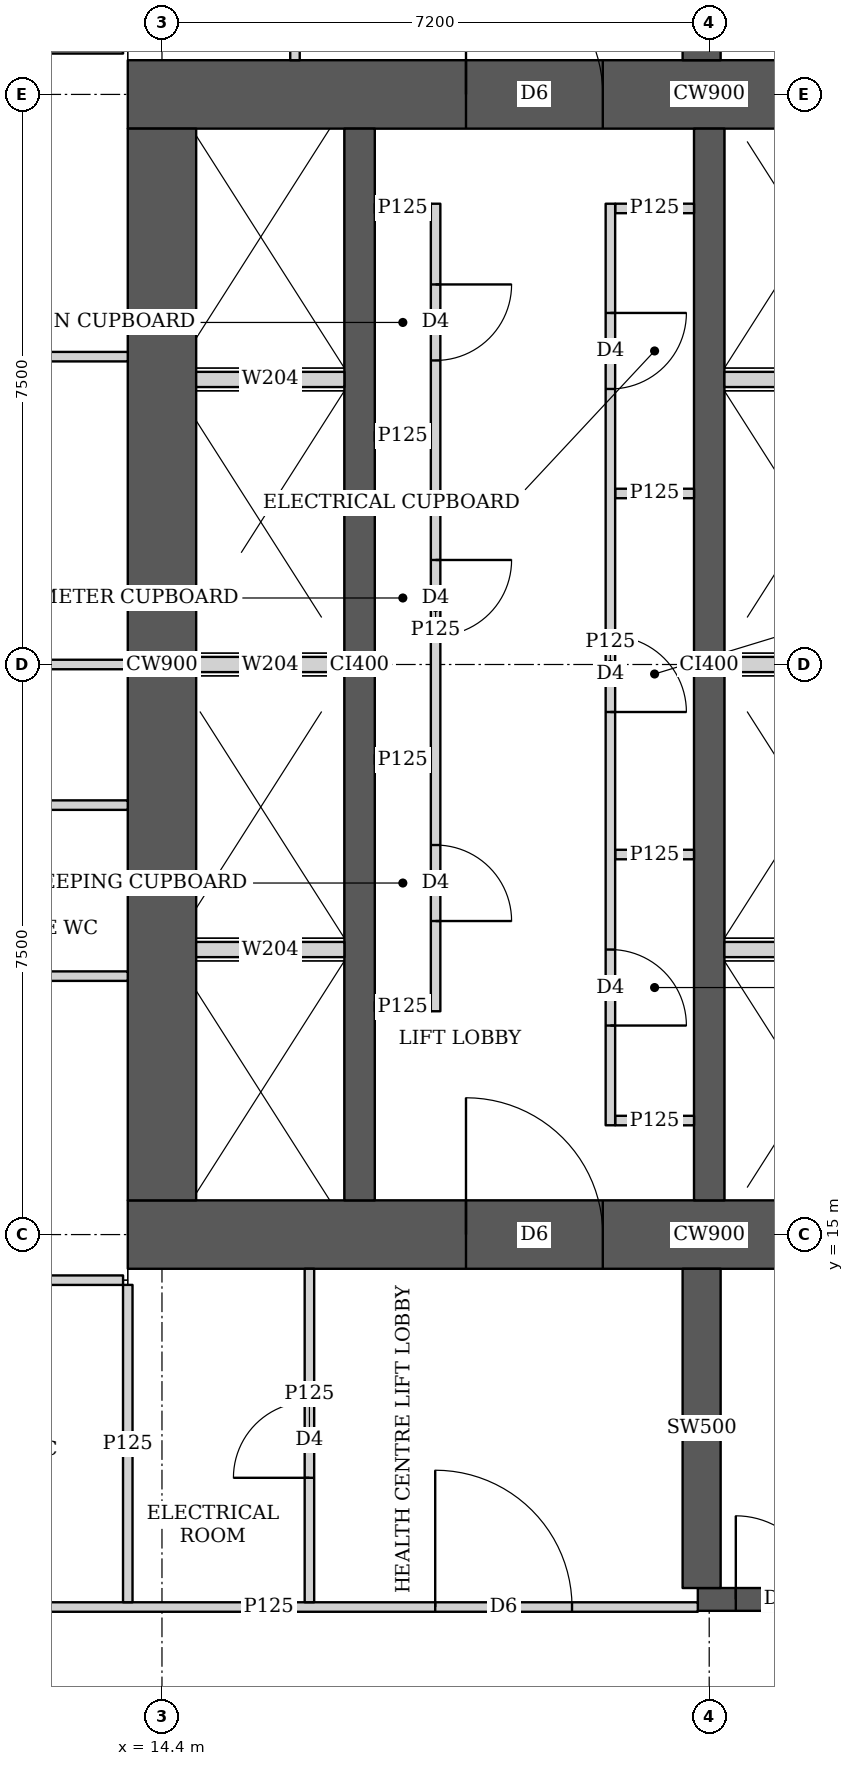
"""IFC4 building model, lengths in metres.
Left out: names, types, materials, properties, quantities, classifications, styles, units other than length and angle.
Written with IfcOpenShell. Run it as: python <this file> out.ifc"""

import sys

from ifc_helpers import new_model, si_unit, direction, frame, frame_2d, origin, place, context, subcontext, project, spatial, rectangle, extrude, element, fill, save


model = new_model("IFC4")
c1 = context("Model", 3, precision=1e-05, world=origin(), true_north=direction((0.0, 1.0)))
c2 = subcontext(c1, "Body", "Model", "MODEL_VIEW")
j1 = project(units=[si_unit("LENGTHUNIT", "METRE"), si_unit("PLANEANGLEUNIT", "RADIAN")], contexts=[c1])
p1 = place(None, origin())
s1 = spatial("IfcSite", under=j1, at=p1, CompositionType="ELEMENT")
p2 = place(p1, origin())
s2 = spatial("IfcBuilding", under=s1, at=p2, CompositionType="ELEMENT")
p3 = place(p2, frame((0.0, 0.0, 5.6)))
s3 = spatial("IfcBuildingStorey", under=s2, at=p3, CompositionType="ELEMENT", Elevation=5.6)
p4 = place(p3, frame((13.95, 15.0, 0.0), z_axis=(0.0, 0.0, 1.0), x_axis=(1.0, 0.0, 0.0)))
e1 = element("IfcWall", 1, at=p4, inside=s3, PredefinedType="SHEAR", context=c2, shape_type="SweptSolid", body=[
    extrude(rectangle(XDim=15.3, YDim=0.9, at=frame_2d((7.65, 0.0))), origin(), (0.0, 0.0, 1.0), 4.5),
])
p5 = place(p4, frame((4.45, 0.0, 0.0)))
e2 = element("IfcOpeningElement", 2, at=p5, cuts=e1, PredefinedType="OPENING", context=c2, shape_type="SweptSolid", body=[
    extrude(rectangle(XDim=1.8, YDim=2.1, at=frame_2d((0.9, 1.05))), frame((0.0, 0.46, 0.0), z_axis=(0.0, -1.0, 0.0), x_axis=(1.0, 0.0, 0.0)), (0.0, 0.0, 1.0), 0.92),
])
p6 = place(p4, frame((10.7, 0.0, 0.0)))
e3 = element("IfcOpeningElement", 3, at=p6, cuts=e1, PredefinedType="OPENING", context=c2, shape_type="SweptSolid", body=[
    extrude(rectangle(XDim=1.1, YDim=2.1, at=frame_2d((0.55, 1.05))), frame((0.0, 0.46, 0.0), z_axis=(0.0, -1.0, 0.0), x_axis=(1.0, 0.0, 0.0)), (0.0, 0.0, 1.0), 0.92),
])
p7 = place(p3, frame((13.95, 30.0, 0.0), z_axis=(0.0, 0.0, 1.0), x_axis=(1.0, 0.0, 0.0)))
e4 = element("IfcWall", 4, at=p7, inside=s3, PredefinedType="SHEAR", context=c2, shape_type="SweptSolid", body=[
    extrude(rectangle(XDim=15.3, YDim=0.9, at=frame_2d((7.65, 0.0))), origin(), (0.0, 0.0, 1.0), 4.5),
])
p8 = place(p7, frame((4.45, 0.0, 0.0)))
e5 = element("IfcOpeningElement", 5, at=p8, cuts=e4, PredefinedType="OPENING", context=c2, shape_type="SweptSolid", body=[
    extrude(rectangle(XDim=1.8, YDim=2.1, at=frame_2d((0.9, 1.05))), frame((0.0, 0.46, 0.0), z_axis=(0.0, -1.0, 0.0), x_axis=(1.0, 0.0, 0.0)), (0.0, 0.0, 1.0), 0.92),
])
p9 = place(p7, frame((10.7, 0.0, 0.0)))
e6 = element("IfcOpeningElement", 6, at=p9, cuts=e4, PredefinedType="OPENING", context=c2, shape_type="SweptSolid", body=[
    extrude(rectangle(XDim=1.1, YDim=2.1, at=frame_2d((0.55, 1.05))), frame((0.0, 0.46, 0.0), z_axis=(0.0, -1.0, 0.0), x_axis=(1.0, 0.0, 0.0)), (0.0, 0.0, 1.0), 0.92),
])
p10 = place(p3, frame((14.4, 15.45, 0.0), z_axis=(0.0, 0.0, 1.0), x_axis=(0.0, 1.0, 0.0)))
e7 = element("IfcWall", 7, at=p10, inside=s3, PredefinedType="SHEAR", context=c2, shape_type="SweptSolid", body=[
    extrude(rectangle(XDim=14.1, YDim=0.9, at=frame_2d((7.05, 0.0))), origin(), (0.0, 0.0, 1.0), 4.5),
])
for number, where, z_axis, x_axis in (
    (8, (17.0, 15.45, 0.0), (0.0, 0.0, 1.0), (0.0, 1.0, 0.0)),
    (9, (21.6, 15.45, 0.0), (0.0, 0.0, 1.0), (0.0, 1.0, 0.0)),
):
    element("IfcWall", number, at=place(p3, frame(where, z_axis=z_axis, x_axis=x_axis)), inside=s3, PredefinedType="SHEAR", context=c2, shape_type="SweptSolid", body=[
        extrude(rectangle(XDim=14.1, YDim=0.4, at=frame_2d((7.05, 0.0))), origin(), (0.0, 0.0, 1.0), 4.5),
    ])
p11 = place(p3, frame((21.45, 10.2, 0.0), z_axis=(0.0, 0.0, 1.0), x_axis=(1.0, 0.0, 0.0)))
e10 = element("IfcWall", 10, at=p11, inside=s3, PredefinedType="SHEAR", context=c2, shape_type="SweptSolid", body=[
    extrude(rectangle(XDim=7.5, YDim=0.3, at=frame_2d((3.75, 0.0))), origin(), (0.0, 0.0, 1.0), 4.5),
])
p12 = place(p11, frame((0.5, 0.0, 0.0)))
e11 = element("IfcOpeningElement", 11, at=p12, cuts=e10, PredefinedType="OPENING", context=c2, shape_type="SweptSolid", body=[
    extrude(rectangle(XDim=1.1, YDim=2.1, at=frame_2d((0.55, 1.05))), frame((0.0, 0.16, 0.0), z_axis=(0.0, -1.0, 0.0), x_axis=(1.0, 0.0, 0.0)), (0.0, 0.0, 1.0), 0.32),
])
for number, where, z_axis, x_axis in (
    (12, (21.5, 10.35, 0.0), (0.0, 0.0, 1.0), (0.0, 1.0, 0.0)),
    (13, (21.5, 30.45, 0.0), (0.0, 0.0, 1.0), (0.0, 1.0, 0.0)),
):
    element("IfcWall", number, at=place(p3, frame(where, z_axis=z_axis, x_axis=x_axis)), inside=s3, PredefinedType="SHEAR", context=c2, shape_type="SweptSolid", body=[
        extrude(rectangle(XDim=4.2, YDim=0.5, at=frame_2d((2.1, 0.0))), origin(), (0.0, 0.0, 1.0), 4.5),
    ])
p13 = place(p3, frame((10.163, 14.4, 0.0), z_axis=(0.0, 0.0, 1.0), x_axis=(1.0, 0.0, 0.0)))
e14 = element("IfcWall", 14, at=p13, inside=s3, PredefinedType="PARTITIONING", context=c2, shape_type="SweptSolid", body=[
    extrude(rectangle(XDim=3.725, YDim=0.125, at=frame_2d((1.862, 0.0))), origin(), (0.0, 0.0, 1.0), 2.6),
])
p14 = place(p3, frame((10.163, 22.5, 0.0), z_axis=(0.0, 0.0, 1.0), x_axis=(1.0, 0.0, 0.0)))
e15 = element("IfcWall", 15, at=p14, inside=s3, PredefinedType="PARTITIONING", context=c2, shape_type="SweptSolid", body=[
    extrude(rectangle(XDim=3.787, YDim=0.125, at=frame_2d((1.894, 0.0))), origin(), (0.0, 0.0, 1.0), 2.6),
])
p15 = place(p3, frame((10.163, 30.6, 0.0), z_axis=(0.0, 0.0, 1.0), x_axis=(1.0, 0.0, 0.0)))
e16 = element("IfcWall", 16, at=p15, inside=s3, PredefinedType="PARTITIONING", context=c2, shape_type="SweptSolid", body=[
    extrude(rectangle(XDim=3.725, YDim=0.125, at=frame_2d((1.862, 0.0))), origin(), (0.0, 0.0, 1.0), 2.6),
])
p16 = place(p3, frame((13.95, 10.163, 0.0), z_axis=(0.0, 0.0, 1.0), x_axis=(0.0, 1.0, 0.0)))
e17 = element("IfcWall", 17, at=p16, inside=s3, PredefinedType="PARTITIONING", context=c2, shape_type="SweptSolid", body=[
    extrude(rectangle(XDim=4.175, YDim=0.125, at=frame_2d((2.087, 0.0))), origin(), (0.0, 0.0, 1.0), 2.6),
])
p17 = place(p3, frame((10.163, 10.1, 0.0), z_axis=(0.0, 0.0, 1.0), x_axis=(1.0, 0.0, 0.0)))
e18 = element("IfcWall", 18, at=p17, inside=s3, PredefinedType="PARTITIONING", context=c2, shape_type="SweptSolid", body=[
    extrude(rectangle(XDim=11.287, YDim=0.125, at=frame_2d((5.644, 0.0))), origin(), (0.0, 0.0, 1.0), 2.2),
])
p18 = place(p17, frame((7.832, 0.0, 0.0)))
e19 = element("IfcOpeningElement", 19, at=p18, cuts=e18, PredefinedType="OPENING", context=c2, shape_type="SweptSolid", body=[
    extrude(rectangle(XDim=1.8, YDim=2.1, at=frame_2d((0.9, 1.05))), frame((0.0, 0.073, 0.0), z_axis=(0.0, -1.0, 0.0), x_axis=(1.0, 0.0, 0.0)), (0.0, 0.0, 1.0), 0.145),
])
p19 = place(p3, frame((16.34, 10.163, 0.0), z_axis=(0.0, 0.0, 1.0), x_axis=(0.0, 1.0, 0.0)))
e20 = element("IfcWall", 20, at=p19, inside=s3, PredefinedType="PARTITIONING", context=c2, shape_type="SweptSolid", body=[
    extrude(rectangle(XDim=4.387, YDim=0.125, at=frame_2d((2.193, 0.0))), origin(), (0.0, 0.0, 1.0), 4.2),
])
p20 = place(p19, frame((1.637, 0.0, 0.0)))
e21 = element("IfcOpeningElement", 21, at=p20, cuts=e20, PredefinedType="OPENING", context=c2, shape_type="SweptSolid", body=[
    extrude(rectangle(XDim=1.0, YDim=2.1, at=frame_2d((0.5, 1.05))), frame((0.0, 0.073, 0.0), z_axis=(0.0, -1.0, 0.0), x_axis=(1.0, 0.0, 0.0)), (0.0, 0.0, 1.0), 0.145),
])
p21 = place(p3, frame((16.15, 30.45, 0.0), z_axis=(0.0, 0.0, 1.0), x_axis=(0.0, 1.0, 0.0)))
e22 = element("IfcWall", 22, at=p21, inside=s3, PredefinedType="PARTITIONING", context=c2, shape_type="SweptSolid", body=[
    extrude(rectangle(XDim=4.387, YDim=0.125, at=frame_2d((2.193, 0.0))), origin(), (0.0, 0.0, 1.0), 4.2),
])
p22 = place(p21, frame((1.75, 0.0, 0.0)))
e23 = element("IfcOpeningElement", 23, at=p22, cuts=e22, PredefinedType="OPENING", context=c2, shape_type="SweptSolid", body=[
    extrude(rectangle(XDim=1.0, YDim=2.1, at=frame_2d((0.5, 1.05))), frame((0.0, 0.073, 0.0), z_axis=(0.0, -1.0, 0.0), x_axis=(1.0, 0.0, 0.0)), (0.0, 0.0, 1.0), 0.145),
])
for number, where, z_axis, x_axis in (
    (24, (10.163, 18.4, 0.0), (0.0, 0.0, 1.0), (1.0, 0.0, 0.0)),
    (25, (10.163, 20.65, 0.0), (0.0, 0.0, 1.0), (1.0, 0.0, 0.0)),
    (26, (10.163, 26.55, 0.0), (0.0, 0.0, 1.0), (1.0, 0.0, 0.0)),
):
    element("IfcWall", number, at=place(p3, frame(where, z_axis=z_axis, x_axis=x_axis)), inside=s3, PredefinedType="PARTITIONING", context=c2, shape_type="SweptSolid", body=[
        extrude(rectangle(XDim=3.787, YDim=0.125, at=frame_2d((1.894, 0.0))), origin(), (0.0, 0.0, 1.0), 4.2),
    ])
p23 = place(p3, frame((20.3, 16.438, 0.0), z_axis=(0.0, 0.0, 1.0), x_axis=(0.0, 1.0, 0.0)))
e27 = element("IfcWall", 27, at=p23, inside=s3, PredefinedType="PARTITIONING", context=c2, shape_type="SweptSolid", body=[
    extrude(rectangle(XDim=12.124, YDim=0.125, at=frame_2d((6.062, 0.0))), origin(), (0.0, 0.0, 1.0), 4.2),
])
p24 = place(p23, frame((1.312, 0.0, 0.0)))
e28 = element("IfcOpeningElement", 28, at=p24, cuts=e27, PredefinedType="OPENING", context=c2, shape_type="SweptSolid", body=[
    extrude(rectangle(XDim=1.0, YDim=2.1, at=frame_2d((0.5, 1.05))), frame((0.0, 0.073, 0.0), z_axis=(0.0, -1.0, 0.0), x_axis=(1.0, 0.0, 0.0)), (0.0, 0.0, 1.0), 0.145),
])
p25 = place(p23, frame((5.437, 0.0, 0.0)))
e29 = element("IfcOpeningElement", 29, at=p25, cuts=e27, PredefinedType="OPENING", context=c2, shape_type="SweptSolid", body=[
    extrude(rectangle(XDim=1.0, YDim=2.1, at=frame_2d((0.5, 1.05))), frame((0.0, 0.073, 0.0), z_axis=(0.0, -1.0, 0.0), x_axis=(1.0, 0.0, 0.0)), (0.0, 0.0, 1.0), 0.145),
])
p26 = place(p23, frame((9.687, 0.0, 0.0)))
e30 = element("IfcOpeningElement", 30, at=p26, cuts=e27, PredefinedType="OPENING", context=c2, shape_type="SweptSolid", body=[
    extrude(rectangle(XDim=1.0, YDim=2.1, at=frame_2d((0.5, 1.05))), frame((0.0, 0.073, 0.0), z_axis=(0.0, -1.0, 0.0), x_axis=(1.0, 0.0, 0.0)), (0.0, 0.0, 1.0), 0.145),
])
for number, where, z_axis, x_axis in (
    (31, (20.363, 16.5, 0.0), (0.0, 0.0, 1.0), (1.0, 0.0, 0.0)),
    (32, (20.363, 28.5, 0.0), (0.0, 0.0, 1.0), (1.0, 0.0, 0.0)),
    (33, (20.363, 20.0, 0.0), (0.0, 0.0, 1.0), (1.0, 0.0, 0.0)),
    (34, (20.363, 24.75, 0.0), (0.0, 0.0, 1.0), (1.0, 0.0, 0.0)),
):
    element("IfcWall", number, at=place(p3, frame(where, z_axis=z_axis, x_axis=x_axis)), inside=s3, PredefinedType="PARTITIONING", context=c2, shape_type="SweptSolid", body=[
        extrude(rectangle(XDim=1.037, YDim=0.125, at=frame_2d((0.519, 0.0))), origin(), (0.0, 0.0, 1.0), 4.2),
    ])
p27 = place(p3, frame((18.0, 28.562, 0.0), z_axis=(0.0, 0.0, 1.0), x_axis=(0.0, -1.0, 0.0)))
e35 = element("IfcWall", 35, at=p27, inside=s3, PredefinedType="PARTITIONING", context=c2, shape_type="SweptSolid", body=[
    extrude(rectangle(XDim=10.624, YDim=0.125, at=frame_2d((5.312, 0.0))), origin(), (0.0, 0.0, 1.0), 4.2),
])
p28 = place(p27, frame((8.437, 0.0, 0.0)))
e36 = element("IfcOpeningElement", 36, at=p28, cuts=e35, PredefinedType="OPENING", context=c2, shape_type="SweptSolid", body=[
    extrude(rectangle(XDim=1.0, YDim=2.1, at=frame_2d((0.5, 1.05))), frame((0.0, 0.073, 0.0), z_axis=(0.0, -1.0, 0.0), x_axis=(1.0, 0.0, 0.0)), (0.0, 0.0, 1.0), 0.145),
])
p29 = place(p27, frame((4.687, 0.0, 0.0)))
e37 = element("IfcOpeningElement", 37, at=p29, cuts=e35, PredefinedType="OPENING", context=c2, shape_type="SweptSolid", body=[
    extrude(rectangle(XDim=1.0, YDim=2.1, at=frame_2d((0.5, 1.05))), frame((0.0, 0.073, 0.0), z_axis=(0.0, -1.0, 0.0), x_axis=(1.0, 0.0, 0.0)), (0.0, 0.0, 1.0), 0.145),
])
p30 = place(p27, frame((1.062, 0.0, 0.0)))
e38 = element("IfcOpeningElement", 38, at=p30, cuts=e35, PredefinedType="OPENING", context=c2, shape_type="SweptSolid", body=[
    extrude(rectangle(XDim=1.0, YDim=2.1, at=frame_2d((0.5, 1.05))), frame((0.0, 0.073, 0.0), z_axis=(0.0, -1.0, 0.0), x_axis=(1.0, 0.0, 0.0)), (0.0, 0.0, 1.0), 0.145),
])
for number, where, z_axis, x_axis in (
    (39, (17.2, 18.0, 0.0), (0.0, 0.0, 1.0), (1.0, 0.0, 0.0)),
    (40, (17.2, 28.5, 0.0), (0.0, 0.0, 1.0), (1.0, 0.0, 0.0)),
    (41, (17.2, 21.25, 0.0), (0.0, 0.0, 1.0), (1.0, 0.0, 0.0)),
    (42, (17.2, 25.5, 0.0), (0.0, 0.0, 1.0), (1.0, 0.0, 0.0)),
):
    element("IfcWall", number, at=place(p3, frame(where, z_axis=z_axis, x_axis=x_axis)), inside=s3, PredefinedType="PARTITIONING", context=c2, shape_type="SweptSolid", body=[
        extrude(rectangle(XDim=0.738, YDim=0.125, at=frame_2d((0.369, 0.0))), origin(), (0.0, 0.0, 1.0), 4.2),
    ])
p31 = place(p3, frame((14.85, 18.75, 0.0), z_axis=(0.0, 0.0, 1.0), x_axis=(1.0, 0.0, 0.0)))
e43 = element("IfcWall", 43, at=p31, inside=s3, PredefinedType="SOLIDWALL", context=c2, shape_type="SweptSolid", body=[
    extrude(rectangle(XDim=1.95, YDim=0.2, at=frame_2d((0.975, 0.0))), origin(), (0.0, 0.0, 1.0), 4.2),
])
p32 = place(p3, frame((21.8, 18.75, 0.0), z_axis=(0.0, 0.0, 1.0), x_axis=(1.0, 0.0, 0.0)))
e44 = element("IfcWall", 44, at=p32, inside=s3, PredefinedType="SOLIDWALL", context=c2, shape_type="SweptSolid", body=[
    extrude(rectangle(XDim=2.2, YDim=0.2, at=frame_2d((1.1, 0.0))), origin(), (0.0, 0.0, 1.0), 4.2),
])
p33 = place(p3, frame((14.85, 22.5, 0.0), z_axis=(0.0, 0.0, 1.0), x_axis=(1.0, 0.0, 0.0)))
e45 = element("IfcWall", 45, at=p33, inside=s3, PredefinedType="SOLIDWALL", context=c2, shape_type="SweptSolid", body=[
    extrude(rectangle(XDim=1.95, YDim=0.2, at=frame_2d((0.975, 0.0))), origin(), (0.0, 0.0, 1.0), 4.2),
])
p34 = place(p3, frame((21.8, 22.5, 0.0), z_axis=(0.0, 0.0, 1.0), x_axis=(1.0, 0.0, 0.0)))
e46 = element("IfcWall", 46, at=p34, inside=s3, PredefinedType="SOLIDWALL", context=c2, shape_type="SweptSolid", body=[
    extrude(rectangle(XDim=2.2, YDim=0.2, at=frame_2d((1.1, 0.0))), origin(), (0.0, 0.0, 1.0), 4.2),
])
p35 = place(p3, frame((14.85, 26.25, 0.0), z_axis=(0.0, 0.0, 1.0), x_axis=(1.0, 0.0, 0.0)))
e47 = element("IfcWall", 47, at=p35, inside=s3, PredefinedType="SOLIDWALL", context=c2, shape_type="SweptSolid", body=[
    extrude(rectangle(XDim=1.95, YDim=0.2, at=frame_2d((0.975, 0.0))), origin(), (0.0, 0.0, 1.0), 4.2),
])
p36 = place(p3, frame((21.8, 26.25, 0.0), z_axis=(0.0, 0.0, 1.0), x_axis=(1.0, 0.0, 0.0)))
e48 = element("IfcWall", 48, at=p36, inside=s3, PredefinedType="SOLIDWALL", context=c2, shape_type="SweptSolid", body=[
    extrude(rectangle(XDim=2.2, YDim=0.2, at=frame_2d((1.1, 0.0))), origin(), (0.0, 0.0, 1.0), 4.2),
])
p37 = place(p20, origin())
e49 = element("IfcDoor", 49, at=p37, inside=s3, OperationType="SINGLE_SWING_LEFT", PredefinedType="DOOR", context=c2, shape_type="SweptSolid", body=[
    extrude(rectangle(XDim=1.0, YDim=2.1, at=frame_2d((0.5, 1.05))), frame((0.0, 0.025, 0.0), z_axis=(0.0, -1.0, 0.0), x_axis=(1.0, 0.0, 0.0)), (0.0, 0.0, 1.0), 0.05),
])
fill(e21, e49)
p38 = place(p18, origin())
e50 = element("IfcDoor", 50, at=p38, inside=s3, OperationType="DOUBLE_DOOR_SINGLE_SWING", PredefinedType="DOOR", context=c2, shape_type="SweptSolid", body=[
    extrude(rectangle(XDim=1.8, YDim=2.1, at=frame_2d((0.9, 1.05))), frame((0.0, 0.025, 0.0), z_axis=(0.0, -1.0, 0.0), x_axis=(1.0, 0.0, 0.0)), (0.0, 0.0, 1.0), 0.05),
])
fill(e19, e50)
p39 = place(p24, origin())
e51 = element("IfcDoor", 51, at=p39, inside=s3, OperationType="SINGLE_SWING_RIGHT", PredefinedType="DOOR", context=c2, shape_type="SweptSolid", body=[
    extrude(rectangle(XDim=1.0, YDim=2.1, at=frame_2d((0.5, 1.05))), frame((0.0, 0.025, 0.0), z_axis=(0.0, -1.0, 0.0), x_axis=(1.0, 0.0, 0.0)), (0.0, 0.0, 1.0), 0.05),
])
fill(e28, e51)
p40 = place(p25, origin())
e52 = element("IfcDoor", 52, at=p40, inside=s3, OperationType="SINGLE_SWING_RIGHT", PredefinedType="DOOR", context=c2, shape_type="SweptSolid", body=[
    extrude(rectangle(XDim=1.0, YDim=2.1, at=frame_2d((0.5, 1.05))), frame((0.0, 0.025, 0.0), z_axis=(0.0, -1.0, 0.0), x_axis=(1.0, 0.0, 0.0)), (0.0, 0.0, 1.0), 0.05),
])
fill(e29, e52)
p41 = place(p26, origin())
e53 = element("IfcDoor", 53, at=p41, inside=s3, OperationType="SINGLE_SWING_LEFT", PredefinedType="DOOR", context=c2, shape_type="SweptSolid", body=[
    extrude(rectangle(XDim=1.0, YDim=2.1, at=frame_2d((0.5, 1.05))), frame((0.0, 0.025, 0.0), z_axis=(0.0, -1.0, 0.0), x_axis=(1.0, 0.0, 0.0)), (0.0, 0.0, 1.0), 0.05),
])
fill(e30, e53)
p42 = place(p28, origin())
e54 = element("IfcDoor", 54, at=p42, inside=s3, OperationType="SINGLE_SWING_RIGHT", PredefinedType="DOOR", context=c2, shape_type="SweptSolid", body=[
    extrude(rectangle(XDim=1.0, YDim=2.1, at=frame_2d((0.5, 1.05))), frame((0.0, 0.025, 0.0), z_axis=(0.0, -1.0, 0.0), x_axis=(1.0, 0.0, 0.0)), (0.0, 0.0, 1.0), 0.05),
])
fill(e36, e54)
p43 = place(p29, origin())
e55 = element("IfcDoor", 55, at=p43, inside=s3, OperationType="SINGLE_SWING_LEFT", PredefinedType="DOOR", context=c2, shape_type="SweptSolid", body=[
    extrude(rectangle(XDim=1.0, YDim=2.1, at=frame_2d((0.5, 1.05))), frame((0.0, 0.025, 0.0), z_axis=(0.0, -1.0, 0.0), x_axis=(1.0, 0.0, 0.0)), (0.0, 0.0, 1.0), 0.05),
])
fill(e37, e55)
p44 = place(p30, origin())
e56 = element("IfcDoor", 56, at=p44, inside=s3, OperationType="SINGLE_SWING_LEFT", PredefinedType="DOOR", context=c2, shape_type="SweptSolid", body=[
    extrude(rectangle(XDim=1.0, YDim=2.1, at=frame_2d((0.5, 1.05))), frame((0.0, 0.025, 0.0), z_axis=(0.0, -1.0, 0.0), x_axis=(1.0, 0.0, 0.0)), (0.0, 0.0, 1.0), 0.05),
])
fill(e38, e56)
p45 = place(p5, origin())
e57 = element("IfcDoor", 57, at=p45, inside=s3, OperationType="DOUBLE_DOOR_SINGLE_SWING", PredefinedType="DOOR", context=c2, shape_type="SweptSolid", body=[
    extrude(rectangle(XDim=1.8, YDim=2.1, at=frame_2d((0.9, 1.05))), frame((0.0, 0.025, 0.0), z_axis=(0.0, -1.0, 0.0), x_axis=(1.0, 0.0, 0.0)), (0.0, 0.0, 1.0), 0.05),
])
fill(e2, e57)
p46 = place(p8, origin())
e58 = element("IfcDoor", 58, at=p46, inside=s3, OperationType="DOUBLE_DOOR_SINGLE_SWING", PredefinedType="DOOR", context=c2, shape_type="SweptSolid", body=[
    extrude(rectangle(XDim=1.8, YDim=2.1, at=frame_2d((0.9, 1.05))), frame((0.0, 0.025, 0.0), z_axis=(0.0, -1.0, 0.0), x_axis=(1.0, 0.0, 0.0)), (0.0, 0.0, 1.0), 0.05),
])
fill(e5, e58)
p47 = place(p12, origin())
e59 = element("IfcDoor", 59, at=p47, inside=s3, OperationType="SINGLE_SWING_LEFT", PredefinedType="DOOR", context=c2, shape_type="SweptSolid", body=[
    extrude(rectangle(XDim=1.1, YDim=2.1, at=frame_2d((0.55, 1.05))), frame((0.0, 0.025, 0.0), z_axis=(0.0, -1.0, 0.0), x_axis=(1.0, 0.0, 0.0)), (0.0, 0.0, 1.0), 0.05),
])
fill(e11, e59)
save(model, sys.argv[1])
